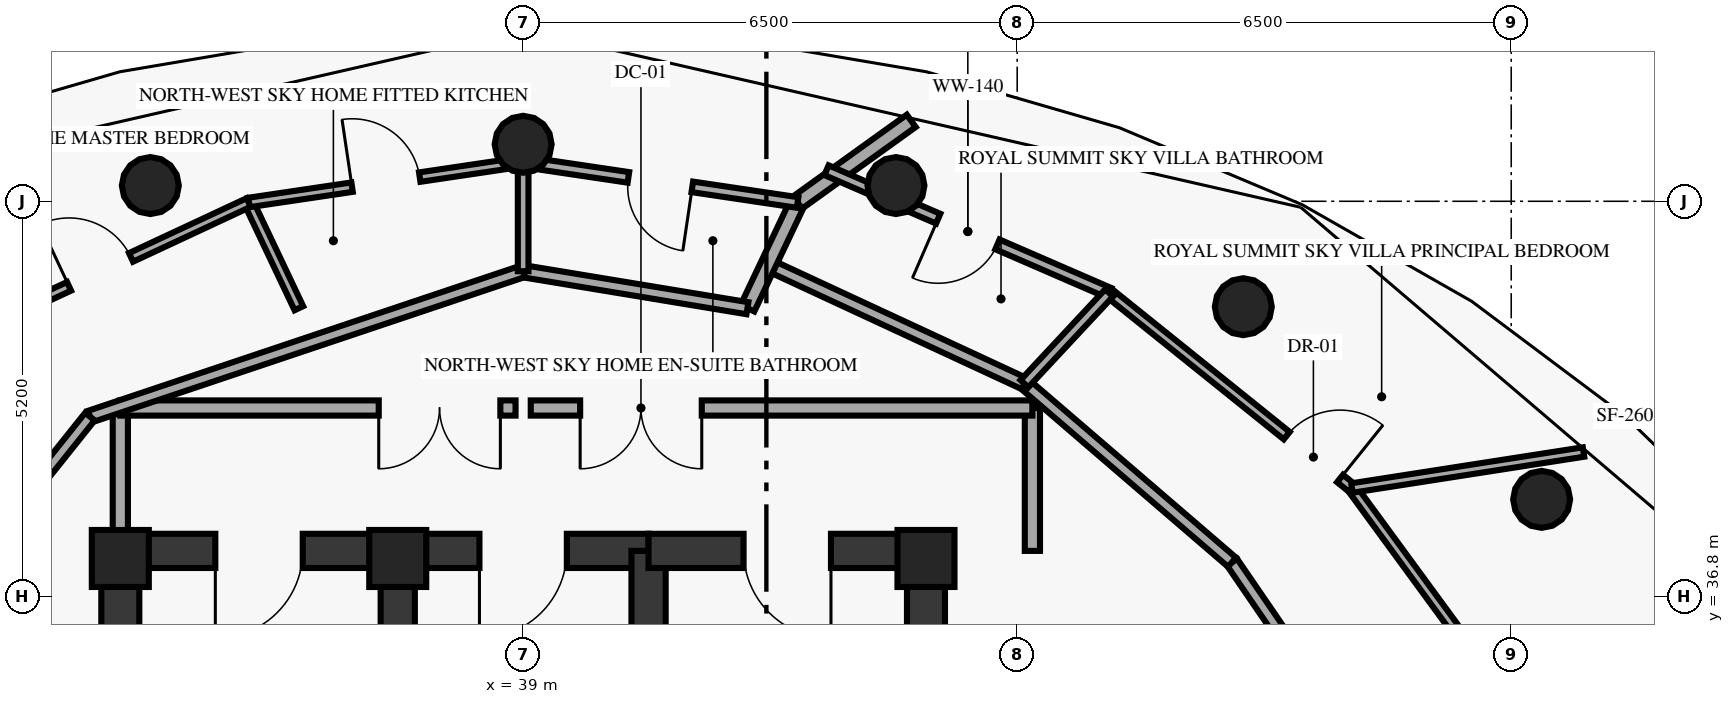
"""IFC4 building model, lengths in metres.
Left out: names, types, materials, properties, quantities, classifications, styles, units other than length and angle.
Written with IfcOpenShell. Run it as: python <this file> out.ifc"""

import sys

from ifc_helpers import new_model, si_unit, direction, frame, frame_2d, origin, origin_2d, place, context, subcontext, project, spatial, rectangle, circle, extrude, element, fill, save


model = new_model("IFC4")
c1 = context("Model", 3, precision=1e-05, world=origin(), true_north=direction((0.0, 1.0)))
c2 = subcontext(c1, "Body", "Model", "MODEL_VIEW")
j1 = project(units=[si_unit("LENGTHUNIT", "METRE"), si_unit("PLANEANGLEUNIT", "RADIAN")], contexts=[c1])
p1 = place(None, origin())
s1 = spatial("IfcSite", under=j1, at=p1, CompositionType="ELEMENT")
p2 = place(p1, origin())
s2 = spatial("IfcBuilding", under=s1, at=p2, CompositionType="ELEMENT")
p3 = place(p2, frame((0.0, 0.0, 297.4)))
s3 = spatial("IfcBuildingStorey", under=s2, at=p3, CompositionType="ELEMENT", Elevation=297.4)
for number, where, z_axis, x_axis in (
    (1, (44.3, 37.3, 0.0), (0.0, 0.0, 1.0), (1.0, 0.0, 0.0)),
    (2, (37.35, 37.3, 0.0), (0.0, 0.0, 1.0), (1.0, 0.0, 0.0)),
    (3, (33.7, 37.3, 0.0), (0.0, 0.0, 1.0), (1.0, 0.0, 0.0)),
):
    element("IfcColumn", number, at=place(p3, frame(where, z_axis=z_axis, x_axis=x_axis)), inside=s3, PredefinedType="PILASTER", context=c2, shape_type="SweptSolid", body=[
        extrude(rectangle(XDim=0.75, YDim=0.75, at=origin_2d()), origin(), (0.0, 0.0, 1.0), 3.45),
    ])
for number, where, z_axis, x_axis in (
    (4, (52.4, 38.078, 0.0), (0.0, 0.0, 1.0), (1.0, 0.0, 0.0)),
    (5, (48.475, 40.613, 0.0), (0.0, 0.0, 1.0), (1.0, 0.0, 0.0)),
    (6, (43.905, 42.207, 0.0), (0.0, 0.0, 1.0), (1.0, 0.0, 0.0)),
    (7, (39.0, 42.75, 0.0), (0.0, 0.0, 1.0), (1.0, 0.0, 0.0)),
    (8, (34.095, 42.207, 0.0), (0.0, 0.0, 1.0), (1.0, 0.0, 0.0)),
):
    element("IfcColumn", number, at=place(p3, frame(where, z_axis=z_axis, x_axis=x_axis)), inside=s3, PredefinedType="COLUMN", context=c2, shape_type="SweptSolid", body=[
        extrude(circle(Radius=0.375, at=origin_2d()), origin(), (0.0, 0.0, 1.0), 3.45),
    ])
for number, where, z_axis, x_axis in (
    (9, (33.7, 29.05, 0.0), (0.0, 0.0, 1.0), (0.0, 1.0, 0.0)),
    (10, (44.3, 29.05, 0.0), (0.0, 0.0, 1.0), (0.0, 1.0, 0.0)),
):
    element("IfcWall", number, at=place(p3, frame(where, z_axis=z_axis, x_axis=x_axis)), inside=s3, PredefinedType="SHEAR", context=c2, shape_type="SweptSolid", body=[
        extrude(rectangle(XDim=8.35, YDim=0.5, at=frame_2d((4.175, 0.0))), origin(), (0.0, 0.0, 1.0), 3.45),
    ])
p4 = place(p3, frame((37.35, 37.4, 0.0), z_axis=(0.0, 0.0, 1.0), x_axis=(-1.0, 0.0, 0.0)))
e11 = element("IfcWall", 11, at=p4, inside=s3, PredefinedType="SHEAR", context=c2, shape_type="SweptSolid", body=[
    extrude(rectangle(XDim=3.65, YDim=0.45, at=frame_2d((1.825, 0.0))), origin(), (0.0, 0.0, 1.0), 3.45),
])
p5 = place(p4, frame((1.25, 0.0, 0.0)))
e12 = element("IfcOpeningElement", 12, at=p5, cuts=e11, PredefinedType="OPENING", context=c2, shape_type="SweptSolid", body=[
    extrude(rectangle(XDim=1.15, YDim=2.15, at=frame_2d((0.575, 1.075))), frame((0.0, 0.235, 0.0), z_axis=(0.0, -1.0, 0.0), x_axis=(1.0, 0.0, 0.0)), (0.0, 0.0, 1.0), 0.47),
])
p6 = place(p3, frame((37.35, 29.05, 0.0), z_axis=(0.0, 0.0, 1.0), x_axis=(0.0, 1.0, 0.0)))
e13 = element("IfcWall", 13, at=p6, inside=s3, PredefinedType="SHEAR", context=c2, shape_type="SweptSolid", body=[
    extrude(rectangle(XDim=8.35, YDim=0.45, at=frame_2d((4.175, 0.0))), origin(), (0.0, 0.0, 1.0), 3.45),
])
p7 = place(p3, frame((40.65, 37.4, 0.0), z_axis=(0.0, 0.0, 1.0), x_axis=(-1.0, 0.0, 0.0)))
e14 = element("IfcWall", 14, at=p7, inside=s3, PredefinedType="SHEAR", context=c2, shape_type="SweptSolid", body=[
    extrude(rectangle(XDim=3.3, YDim=0.45, at=frame_2d((1.65, 0.0))), origin(), (0.0, 0.0, 1.0), 3.45),
])
p8 = place(p7, frame((1.075, 0.0, 0.0)))
e15 = element("IfcOpeningElement", 15, at=p8, cuts=e14, PredefinedType="OPENING", context=c2, shape_type="SweptSolid", body=[
    extrude(rectangle(XDim=1.15, YDim=2.15, at=frame_2d((0.575, 1.075))), frame((0.0, 0.235, 0.0), z_axis=(0.0, -1.0, 0.0), x_axis=(1.0, 0.0, 0.0)), (0.0, 0.0, 1.0), 0.47),
])
p9 = place(p3, frame((40.65, 29.05, 0.0), z_axis=(0.0, 0.0, 1.0), x_axis=(0.0, 1.0, 0.0)))
e16 = element("IfcWall", 16, at=p9, inside=s3, PredefinedType="SHEAR", context=c2, shape_type="SweptSolid", body=[
    extrude(rectangle(XDim=8.35, YDim=0.45, at=frame_2d((4.175, 0.0))), origin(), (0.0, 0.0, 1.0), 3.45),
])
p10 = place(p3, frame((44.3, 37.4, 0.0), z_axis=(0.0, 0.0, 1.0), x_axis=(-1.0, 0.0, 0.0)))
e17 = element("IfcWall", 17, at=p10, inside=s3, PredefinedType="SHEAR", context=c2, shape_type="SweptSolid", body=[
    extrude(rectangle(XDim=3.65, YDim=0.45, at=frame_2d((1.825, 0.0))), origin(), (0.0, 0.0, 1.0), 3.45),
])
p11 = place(p10, frame((1.25, 0.0, 0.0)))
e18 = element("IfcOpeningElement", 18, at=p11, cuts=e17, PredefinedType="OPENING", context=c2, shape_type="SweptSolid", body=[
    extrude(rectangle(XDim=1.15, YDim=2.15, at=frame_2d((0.575, 1.075))), frame((0.0, 0.235, 0.0), z_axis=(0.0, -1.0, 0.0), x_axis=(1.0, 0.0, 0.0)), (0.0, 0.0, 1.0), 0.47),
])
for number, where, z_axis, x_axis in (
    (19, (33.7, 37.4, 0.0), (0.0, 0.0, 1.0), (0.0, 1.0, 0.0)),
    (20, (45.7, 37.4, 0.0), (0.0, 0.0, 1.0), (0.0, 1.0, 0.0)),
):
    element("IfcWall", number, at=place(p3, frame(where, z_axis=z_axis, x_axis=x_axis)), inside=s3, PredefinedType="SOLIDWALL", context=c2, shape_type="SweptSolid", body=[
        extrude(rectangle(XDim=1.88, YDim=0.2, at=frame_2d((0.94, 0.0))), origin(), (0.0, 0.0, 1.0), 3.45),
    ])
p12 = place(p3, frame((38.9, 39.28, 0.0), z_axis=(0.0, 0.0, 1.0), x_axis=(-1.0, 0.0, 0.0)))
e21 = element("IfcWall", 21, at=p12, inside=s3, PredefinedType="SOLIDWALL", context=c2, shape_type="SweptSolid", body=[
    extrude(rectangle(XDim=5.2, YDim=0.2, at=frame_2d((2.6, 0.0))), origin(), (0.0, 0.0, 1.0), 3.45),
])
p13 = place(p12, frame((0.2, 0.0, 0.0)))
e22 = element("IfcOpeningElement", 22, at=p13, cuts=e21, PredefinedType="OPENING", context=c2, shape_type="SweptSolid", body=[
    extrude(rectangle(XDim=1.6, YDim=2.2, at=frame_2d((0.8, 1.1))), frame((0.0, 0.11, 0.0), z_axis=(0.0, -1.0, 0.0), x_axis=(1.0, 0.0, 0.0)), (0.0, 0.0, 1.0), 0.22),
])
p14 = place(p3, frame((45.7, 39.28, 0.0), z_axis=(0.0, 0.0, 1.0), x_axis=(-1.0, 0.0, 0.0)))
e23 = element("IfcWall", 23, at=p14, inside=s3, PredefinedType="SOLIDWALL", context=c2, shape_type="SweptSolid", body=[
    extrude(rectangle(XDim=6.6, YDim=0.2, at=frame_2d((3.3, 0.0))), origin(), (0.0, 0.0, 1.0), 3.45),
])
p15 = place(p14, frame((4.35, 0.0, 0.0)))
e24 = element("IfcOpeningElement", 24, at=p15, cuts=e23, PredefinedType="OPENING", context=c2, shape_type="SweptSolid", body=[
    extrude(rectangle(XDim=1.6, YDim=2.2, at=frame_2d((0.8, 1.1))), frame((0.0, 0.11, 0.0), z_axis=(0.0, -1.0, 0.0), x_axis=(1.0, 0.0, 0.0)), (0.0, 0.0, 1.0), 0.22),
])
p16 = place(p3, frame((50.423, 34.19, 0.0), z_axis=(0.0, 0.0, 1.0), x_axis=(-0.565014144236, 0.825081218313, 0.0)))
e25 = element("IfcWall", 25, at=p16, inside=s3, PredefinedType="PARTITIONING", context=c2, shape_type="SweptSolid", body=[
    extrude(rectangle(XDim=3.71, YDim=0.16, at=frame_2d((1.855, 0.0))), origin(), (0.0, 0.0, 1.0), 3.45),
])
p17 = place(p3, frame((48.327, 37.251, 0.0), z_axis=(0.0, 0.0, 1.0), x_axis=(-0.758232091793, 0.651984735231, 0.0)))
e26 = element("IfcWall", 26, at=p17, inside=s3, PredefinedType="PARTITIONING", context=c2, shape_type="SweptSolid", body=[
    extrude(rectangle(XDim=3.603, YDim=0.16, at=frame_2d((1.802, 0.0))), origin(), (0.0, 0.0, 1.0), 3.45),
])
p18 = place(p3, frame((45.595, 39.6, 0.0), z_axis=(0.0, 0.0, 1.0), x_axis=(-0.907123576348, 0.420864369166, 0.0)))
e27 = element("IfcWall", 27, at=p18, inside=s3, PredefinedType="PARTITIONING", context=c2, shape_type="SweptSolid", body=[
    extrude(rectangle(XDim=3.719, YDim=0.16, at=frame_2d((1.859, 0.0))), origin(), (0.0, 0.0, 1.0), 3.45),
])
p19 = place(p3, frame((41.951, 40.593, 0.0), z_axis=(0.0, 0.0, 1.0), x_axis=(0.428788325004, 0.903404987998, 0.0)))
e28 = element("IfcWall", 28, at=p19, inside=s3, PredefinedType="PARTITIONING", context=c2, shape_type="SweptSolid", body=[
    extrude(rectangle(XDim=1.54, YDim=0.2, at=frame_2d((0.77, 0.0))), origin(), (0.0, 0.0, 1.0), 3.45),
])
p20 = place(p3, frame((42.611, 41.984, 0.0), z_axis=(0.0, 0.0, 1.0), x_axis=(0.812072329423, 0.583556793967, 0.0)))
e29 = element("IfcWall", 29, at=p20, inside=s3, PredefinedType="PARTITIONING", context=c2, shape_type="SweptSolid", body=[
    extrude(rectangle(XDim=1.841, YDim=0.2, at=frame_2d((0.92, 0.0))), origin(), (0.0, 0.0, 1.0), 3.45),
])
p21 = place(p3, frame((52.354, 34.88, 0.0), z_axis=(0.0, 0.0, 1.0), x_axis=(-0.590636208364, 0.806937958811, 0.0)))
e30 = element("IfcWall", 30, at=p21, inside=s3, PredefinedType="PARTITIONING", context=c2, shape_type="SweptSolid", body=[
    extrude(rectangle(XDim=4.148, YDim=0.125, at=frame_2d((2.074, 0.0))), origin(), (0.0, 0.0, 1.0), 3.45),
])
p22 = place(p3, frame((46.71, 40.795, 0.0), z_axis=(0.0, 0.0, 1.0), x_axis=(0.779367114883, -0.62656755441, 0.0)))
e31 = element("IfcWall", 31, at=p22, inside=s3, PredefinedType="PARTITIONING", context=c2, shape_type="SweptSolid", body=[
    extrude(rectangle(XDim=4.098, YDim=0.125, at=frame_2d((2.049, 0.0))), origin(), (0.0, 0.0, 1.0), 3.45),
])
p23 = place(p22, frame((2.998, 0.0, 0.0)))
e32 = element("IfcOpeningElement", 32, at=p23, cuts=e31, PredefinedType="OPENING", context=c2, shape_type="SweptSolid", body=[
    extrude(rectangle(XDim=0.9, YDim=2.1, at=frame_2d((0.45, 1.05))), frame((0.0, 0.073, 0.0), z_axis=(0.0, -1.0, 0.0), x_axis=(1.0, 0.0, 0.0)), (0.0, 0.0, 1.0), 0.145),
])
p24 = place(p3, frame((42.991, 42.409, 0.0), z_axis=(0.0, 0.0, 1.0), x_axis=(0.917335052278, -0.398116065818, 0.0)))
e33 = element("IfcWall", 33, at=p24, inside=s3, PredefinedType="PARTITIONING", context=c2, shape_type="SweptSolid", body=[
    extrude(rectangle(XDim=4.054, YDim=0.14, at=frame_2d((2.027, 0.0))), origin(), (0.0, 0.0, 1.0), 3.45),
])
p25 = place(p24, frame((1.602, 0.0, 0.0)))
e34 = element("IfcOpeningElement", 34, at=p25, cuts=e33, PredefinedType="OPENING", context=c2, shape_type="SweptSolid", body=[
    extrude(rectangle(XDim=0.85, YDim=2.1, at=frame_2d((0.425, 1.05))), frame((0.0, 0.08, 0.0), z_axis=(0.0, -1.0, 0.0), x_axis=(1.0, 0.0, 0.0)), (0.0, 0.0, 1.0), 0.16),
])
p26 = place(p3, frame((45.595, 39.6, 0.0), z_axis=(0.0, 0.0, 1.0), x_axis=(0.682259699027, 0.731109911767, 0.0)))
e35 = element("IfcWall", 35, at=p26, inside=s3, PredefinedType="PARTITIONING", context=c2, shape_type="SweptSolid", body=[
    extrude(rectangle(XDim=1.634, YDim=0.14, at=frame_2d((0.817, 0.0))), origin(), (0.0, 0.0, 1.0), 3.45),
])
p27 = place(p3, frame((49.904, 38.227, 0.0), z_axis=(0.0, 0.0, 1.0), x_axis=(0.988120477063, 0.153681237659, 0.0)))
e36 = element("IfcWall", 36, at=p27, inside=s3, PredefinedType="PARTITIONING", context=c2, shape_type="SweptSolid", body=[
    extrude(rectangle(XDim=3.083, YDim=0.125, at=frame_2d((1.542, 0.0))), origin(), (0.0, 0.0, 1.0), 3.45),
])
p28 = place(p3, frame((41.951, 40.593, 0.0), z_axis=(0.0, 0.0, 1.0), x_axis=(-0.986650832406, 0.162850038111, 0.0)))
e37 = element("IfcWall", 37, at=p28, inside=s3, PredefinedType="PARTITIONING", context=c2, shape_type="SweptSolid", body=[
    extrude(rectangle(XDim=2.991, YDim=0.16, at=frame_2d((1.496, 0.0))), origin(), (0.0, 0.0, 1.0), 3.45),
])
p29 = place(p3, frame((39.0, 41.08, 0.0), z_axis=(0.0, 0.0, 1.0), x_axis=(-0.948027514656, -0.318188358455, 0.0)))
e38 = element("IfcWall", 38, at=p29, inside=s3, PredefinedType="PARTITIONING", context=c2, shape_type="SweptSolid", body=[
    extrude(rectangle(XDim=6.012, YDim=0.16, at=frame_2d((3.006, 0.0))), origin(), (0.0, 0.0, 1.0), 3.45),
])
p30 = place(p3, frame((33.3, 39.167, 0.0), z_axis=(0.0, 0.0, 1.0), x_axis=(-0.623915746766, -0.781491612839, 0.0)))
e39 = element("IfcWall", 39, at=p30, inside=s3, PredefinedType="PARTITIONING", context=c2, shape_type="SweptSolid", body=[
    extrude(rectangle(XDim=6.688, YDim=0.16, at=frame_2d((3.344, 0.0))), origin(), (0.0, 0.0, 1.0), 3.45),
])
p31 = place(p3, frame((39.0, 41.08, 0.0), z_axis=(0.0, 0.0, 1.0), x_axis=(0.0, 1.0, 0.0)))
e40 = element("IfcWall", 40, at=p31, inside=s3, PredefinedType="PARTITIONING", context=c2, shape_type="SweptSolid", body=[
    extrude(rectangle(XDim=1.44, YDim=0.14, at=frame_2d((0.72, 0.0))), origin(), (0.0, 0.0, 1.0), 3.45),
])
p32 = place(p3, frame((36.049, 40.593, 0.0), z_axis=(0.0, 0.0, 1.0), x_axis=(-0.428788325004, 0.903404987998, 0.0)))
e41 = element("IfcWall", 41, at=p32, inside=s3, PredefinedType="PARTITIONING", context=c2, shape_type="SweptSolid", body=[
    extrude(rectangle(XDim=1.54, YDim=0.125, at=frame_2d((0.77, 0.0))), origin(), (0.0, 0.0, 1.0), 3.45),
])
p33 = place(p3, frame((39.0, 42.52, 0.0), z_axis=(0.0, 0.0, 1.0), x_axis=(0.989157453542, -0.146858884996, 0.0)))
e42 = element("IfcWall", 42, at=p33, inside=s3, PredefinedType="PARTITIONING", context=c2, shape_type="SweptSolid", body=[
    extrude(rectangle(XDim=3.651, YDim=0.14, at=frame_2d((1.825, 0.0))), origin(), (0.0, 0.0, 1.0), 3.45),
])
p34 = place(p33, frame((1.4, 0.0, 0.0)))
e43 = element("IfcOpeningElement", 43, at=p34, cuts=e42, PredefinedType="OPENING", context=c2, shape_type="SweptSolid", body=[
    extrude(rectangle(XDim=0.85, YDim=2.1, at=frame_2d((0.425, 1.05))), frame((0.0, 0.08, 0.0), z_axis=(0.0, -1.0, 0.0), x_axis=(1.0, 0.0, 0.0)), (0.0, 0.0, 1.0), 0.16),
])
p35 = place(p3, frame((35.389, 41.984, 0.0), z_axis=(0.0, 0.0, 1.0), x_axis=(0.989157453542, 0.146858884996, 0.0)))
e44 = element("IfcWall", 44, at=p35, inside=s3, PredefinedType="PARTITIONING", context=c2, shape_type="SweptSolid", body=[
    extrude(rectangle(XDim=3.651, YDim=0.125, at=frame_2d((1.825, 0.0))), origin(), (0.0, 0.0, 1.0), 3.45),
])
p36 = place(p35, frame((1.375, 0.0, 0.0)))
e45 = element("IfcOpeningElement", 45, at=p36, cuts=e44, PredefinedType="OPENING", context=c2, shape_type="SweptSolid", body=[
    extrude(rectangle(XDim=0.9, YDim=2.1, at=frame_2d((0.45, 1.05))), frame((0.0, 0.073, 0.0), z_axis=(0.0, -1.0, 0.0), x_axis=(1.0, 0.0, 0.0)), (0.0, 0.0, 1.0), 0.145),
])
p37 = place(p3, frame((32.025, 40.414, 0.0), z_axis=(0.0, 0.0, 1.0), x_axis=(0.906188180382, 0.422874664334, 0.0)))
e46 = element("IfcWall", 46, at=p37, inside=s3, PredefinedType="PARTITIONING", context=c2, shape_type="SweptSolid", body=[
    extrude(rectangle(XDim=3.712, YDim=0.125, at=frame_2d((1.856, 0.0))), origin(), (0.0, 0.0, 1.0), 3.45),
])
p38 = place(p37, frame((1.104, 0.0, 0.0)))
e47 = element("IfcOpeningElement", 47, at=p38, cuts=e46, PredefinedType="OPENING", context=c2, shape_type="SweptSolid", body=[
    extrude(rectangle(XDim=0.9, YDim=2.1, at=frame_2d((0.45, 1.05))), frame((0.0, 0.073, 0.0), z_axis=(0.0, -1.0, 0.0), x_axis=(1.0, 0.0, 0.0)), (0.0, 0.0, 1.0), 0.145),
])
p39 = place(p5, origin())
e48 = element("IfcDoor", 48, at=p39, inside=s3, OperationType="SINGLE_SWING_RIGHT", PredefinedType="DOOR", context=c2, shape_type="SweptSolid", body=[
    extrude(rectangle(XDim=1.15, YDim=2.15, at=frame_2d((0.575, 1.075))), frame((0.0, 0.025, 0.0), z_axis=(0.0, -1.0, 0.0), x_axis=(1.0, 0.0, 0.0)), (0.0, 0.0, 1.0), 0.05),
])
fill(e12, e48)
p40 = place(p8, origin())
e49 = element("IfcDoor", 49, at=p40, inside=s3, OperationType="SINGLE_SWING_RIGHT", PredefinedType="DOOR", context=c2, shape_type="SweptSolid", body=[
    extrude(rectangle(XDim=1.15, YDim=2.15, at=frame_2d((0.575, 1.075))), frame((0.0, 0.025, 0.0), z_axis=(0.0, -1.0, 0.0), x_axis=(1.0, 0.0, 0.0)), (0.0, 0.0, 1.0), 0.05),
])
fill(e15, e49)
p41 = place(p11, origin())
e50 = element("IfcDoor", 50, at=p41, inside=s3, OperationType="SINGLE_SWING_LEFT", PredefinedType="DOOR", context=c2, shape_type="SweptSolid", body=[
    extrude(rectangle(XDim=1.15, YDim=2.15, at=frame_2d((0.575, 1.075))), frame((0.0, 0.025, 0.0), z_axis=(0.0, -1.0, 0.0), x_axis=(1.0, 0.0, 0.0)), (0.0, 0.0, 1.0), 0.05),
])
fill(e18, e50)
p42 = place(p13, origin())
e51 = element("IfcDoor", 51, at=p42, inside=s3, OperationType="DOUBLE_DOOR_SINGLE_SWING", PredefinedType="DOOR", context=c2, shape_type="SweptSolid", body=[
    extrude(rectangle(XDim=1.6, YDim=2.2, at=frame_2d((0.8, 1.1))), frame((0.0, 0.025, 0.0), z_axis=(0.0, -1.0, 0.0), x_axis=(1.0, 0.0, 0.0)), (0.0, 0.0, 1.0), 0.05),
])
fill(e22, e51)
p43 = place(p15, origin())
e52 = element("IfcDoor", 52, at=p43, inside=s3, OperationType="DOUBLE_DOOR_SINGLE_SWING", PredefinedType="DOOR", context=c2, shape_type="SweptSolid", body=[
    extrude(rectangle(XDim=1.6, YDim=2.2, at=frame_2d((0.8, 1.1))), frame((0.0, 0.025, 0.0), z_axis=(0.0, -1.0, 0.0), x_axis=(1.0, 0.0, 0.0)), (0.0, 0.0, 1.0), 0.05),
])
fill(e24, e52)
p44 = place(p23, origin())
e53 = element("IfcDoor", 53, at=p44, inside=s3, OperationType="SINGLE_SWING_RIGHT", PredefinedType="DOOR", context=c2, shape_type="SweptSolid", body=[
    extrude(rectangle(XDim=0.9, YDim=2.1, at=frame_2d((0.45, 1.05))), frame((0.0, 0.025, 0.0), z_axis=(0.0, -1.0, 0.0), x_axis=(1.0, 0.0, 0.0)), (0.0, 0.0, 1.0), 0.05),
])
fill(e32, e53)
p45 = place(p25, origin())
e54 = element("IfcDoor", 54, at=p45, inside=s3, OperationType="SINGLE_SWING_LEFT", PredefinedType="DOOR", context=c2, shape_type="SweptSolid", body=[
    extrude(rectangle(XDim=0.85, YDim=2.1, at=frame_2d((0.425, 1.05))), frame((0.0, 0.025, 0.0), z_axis=(0.0, -1.0, 0.0), x_axis=(1.0, 0.0, 0.0)), (0.0, 0.0, 1.0), 0.05),
])
fill(e34, e54)
p46 = place(p34, origin())
e55 = element("IfcDoor", 55, at=p46, inside=s3, OperationType="SINGLE_SWING_RIGHT", PredefinedType="DOOR", context=c2, shape_type="SweptSolid", body=[
    extrude(rectangle(XDim=0.85, YDim=2.1, at=frame_2d((0.425, 1.05))), frame((0.0, 0.025, 0.0), z_axis=(0.0, -1.0, 0.0), x_axis=(1.0, 0.0, 0.0)), (0.0, 0.0, 1.0), 0.05),
])
fill(e43, e55)
p47 = place(p36, origin())
e56 = element("IfcDoor", 56, at=p47, inside=s3, OperationType="SINGLE_SWING_LEFT", PredefinedType="DOOR", context=c2, shape_type="SweptSolid", body=[
    extrude(rectangle(XDim=0.9, YDim=2.1, at=frame_2d((0.45, 1.05))), frame((0.0, 0.025, 0.0), z_axis=(0.0, -1.0, 0.0), x_axis=(1.0, 0.0, 0.0)), (0.0, 0.0, 1.0), 0.05),
])
fill(e45, e56)
p48 = place(p38, origin())
e57 = element("IfcDoor", 57, at=p48, inside=s3, OperationType="SINGLE_SWING_LEFT", PredefinedType="DOOR", context=c2, shape_type="SweptSolid", body=[
    extrude(rectangle(XDim=0.9, YDim=2.1, at=frame_2d((0.45, 1.05))), frame((0.0, 0.025, 0.0), z_axis=(0.0, -1.0, 0.0), x_axis=(1.0, 0.0, 0.0)), (0.0, 0.0, 1.0), 0.05),
])
fill(e47, e57)
save(model, sys.argv[1])
